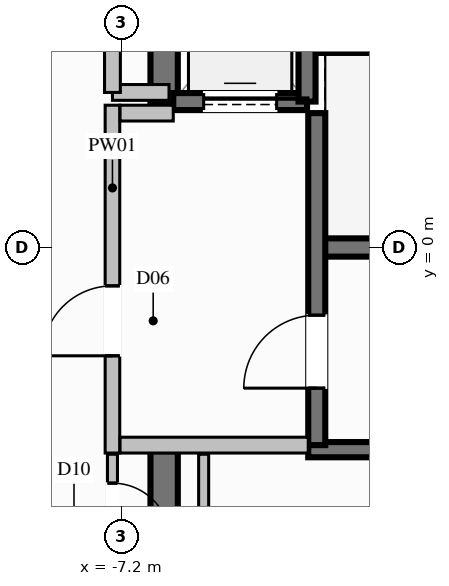
"""IFC4 building model, lengths in metres.
Left out: names, types, materials, properties, quantities, classifications, styles, units other than length and angle.
Written with IfcOpenShell. Run it as: python <this file> out.ifc"""

import sys

from ifc_helpers import new_model, si_unit, direction, frame, frame_2d, origin, place, context, subcontext, project, spatial, rectangle, extrude, element, fill, save


model = new_model("IFC4")
c1 = context("Model", 3, precision=1e-05, world=origin(), true_north=direction((0.0, 1.0)))
c2 = subcontext(c1, "Body", "Model", "MODEL_VIEW")
j1 = project(units=[si_unit("LENGTHUNIT", "METRE"), si_unit("PLANEANGLEUNIT", "RADIAN")], contexts=[c1])
p1 = place(None, origin())
s1 = spatial("IfcSite", under=j1, at=p1, CompositionType="ELEMENT")
p2 = place(p1, origin())
s2 = spatial("IfcBuilding", under=s1, at=p2, CompositionType="ELEMENT")
p3 = place(p2, frame((0.0, 0.0, 278.2)))
s3 = spatial("IfcBuildingStorey", under=s2, at=p3, CompositionType="ELEMENT", Elevation=278.2)
p4 = place(p3, frame((-3.99, 0.0, 0.0), z_axis=(0.0, 0.0, 1.0), x_axis=(1.0, 0.0, 0.0)))
e1 = element("IfcWall", 1, at=p4, inside=s3, PredefinedType="SHEAR", context=c2, shape_type="SweptSolid", body=[
    extrude(rectangle(XDim=7.98, YDim=0.3, at=frame_2d((3.99, 0.0))), origin(), (0.0, 0.0, 1.0), 3.8),
])
for number, where, z_axis, x_axis in (
    (2, (-4.13, -3.325, 0.0), (0.0, 0.0, 1.0), (1.0, 0.0, 0.0)),
    (3, (-4.13, 3.325, 0.0), (0.0, 0.0, 1.0), (1.0, 0.0, 0.0)),
):
    element("IfcWall", number, at=place(p3, frame(where, z_axis=z_axis, x_axis=x_axis)), inside=s3, PredefinedType="SOLIDWALL", context=c2, shape_type="SweptSolid", body=[
        extrude(rectangle(XDim=8.26, YDim=0.25, at=frame_2d((4.13, 0.0))), origin(), (0.0, 0.0, 1.0), 3.8),
    ])
p5 = place(p3, frame((-6.5, 2.35, 0.0), z_axis=(0.0, 0.0, 1.0), x_axis=(0.0, 1.0, 0.0)))
e4 = element("IfcWall", 4, at=p5, inside=s3, PredefinedType="SHEAR", context=c2, shape_type="SweptSolid", body=[
    extrude(rectangle(XDim=3.975, YDim=0.45, at=frame_2d((1.987, 0.0))), origin(), (0.0, 0.0, 1.0), 3.8),
])
p6 = place(p3, frame((-6.5, -6.325, 0.0), z_axis=(0.0, 0.0, 1.0), x_axis=(0.0, 1.0, 0.0)))
e5 = element("IfcWall", 5, at=p6, inside=s3, PredefinedType="SHEAR", context=c2, shape_type="SweptSolid", body=[
    extrude(rectangle(XDim=2.975, YDim=0.45, at=frame_2d((1.487, 0.0))), origin(), (0.0, 0.0, 1.0), 3.8),
])
p7 = place(p3, frame((-6.35, 2.4, 0.0), z_axis=(0.0, 0.0, 1.0), x_axis=(1.0, 0.0, 0.0)))
e6 = element("IfcWall", 6, at=p7, inside=s3, PredefinedType="SOLIDWALL", context=c2, shape_type="SweptSolid", body=[
    extrude(rectangle(XDim=2.2, YDim=0.28, at=frame_2d((1.1, 0.0))), origin(), (0.0, 0.0, 1.0), 3.57),
])
p8 = place(p7, frame((0.5, 0.0, 0.0)))
e7 = element("IfcOpeningElement", 7, at=p8, cuts=e6, PredefinedType="OPENING", context=c2, shape_type="SweptSolid", body=[
    extrude(rectangle(XDim=1.2, YDim=2.2, at=frame_2d((0.6, 1.1))), frame((0.0, 0.15, 0.0), z_axis=(0.0, -1.0, 0.0), x_axis=(1.0, 0.0, 0.0)), (0.0, 0.0, 1.0), 0.3),
])
p9 = place(p3, frame((-4.15, 2.4, 0.0), z_axis=(0.0, 0.0, 1.0), x_axis=(0.0, 1.0, 0.0)))
e8 = element("IfcWall", 8, at=p9, inside=s3, PredefinedType="SOLIDWALL", context=c2, shape_type="SweptSolid", body=[
    extrude(rectangle(XDim=2.7, YDim=0.28, at=frame_2d((1.35, 0.0))), origin(), (0.0, 0.0, 1.0), 3.57),
])
p10 = place(p3, frame((-3.99, -3.25, 0.0), z_axis=(0.0, 0.0, 1.0), x_axis=(0.0, 1.0, 0.0)))
e9 = element("IfcWall", 9, at=p10, inside=s3, PredefinedType="SOLIDWALL", context=c2, shape_type="SweptSolid", body=[
    extrude(rectangle(XDim=5.46, YDim=0.28, at=frame_2d((2.73, 0.0))), origin(), (0.0, 0.0, 1.0), 3.57),
])
p11 = place(p10, frame((0.937, 0.0, 0.0)))
e10 = element("IfcOpeningElement", 10, at=p11, cuts=e9, PredefinedType="OPENING", context=c2, shape_type="SweptSolid", body=[
    extrude(rectangle(XDim=1.2, YDim=2.2, at=frame_2d((0.6, 1.1))), frame((0.0, 0.15, 0.0), z_axis=(0.0, -1.0, 0.0), x_axis=(1.0, 0.0, 0.0)), (0.0, 0.0, 1.0), 0.3),
])
p12 = place(p3, frame((-7.35, -3.38, 0.0), z_axis=(0.0, 0.0, 1.0), x_axis=(0.0, 1.0, 0.0)))
e11 = element("IfcWall", 11, at=p12, inside=s3, PredefinedType="PARTITIONING", context=c2, shape_type="SweptSolid", body=[
    extrude(rectangle(XDim=5.72, YDim=0.24, at=frame_2d((2.86, 0.0))), origin(), (0.0, 0.0, 1.0), 2.655),
])
p13 = place(p12, frame((1.599, 0.0, 0.0)))
e12 = element("IfcOpeningElement", 12, at=p13, cuts=e11, PredefinedType="OPENING", context=c2, shape_type="SweptSolid", body=[
    extrude(rectangle(XDim=1.15, YDim=2.2, at=frame_2d((0.575, 1.1))), frame((0.0, 0.13, 0.0), z_axis=(0.0, -1.0, 0.0), x_axis=(1.0, 0.0, 0.0)), (0.0, 0.0, 1.0), 0.26),
])
p14 = place(p3, frame((-7.225, -3.25, 0.0), z_axis=(0.0, 0.0, 1.0), x_axis=(1.0, 0.0, 0.0)))
e13 = element("IfcWall", 13, at=p14, inside=s3, PredefinedType="PARTITIONING", context=c2, shape_type="SweptSolid", body=[
    extrude(rectangle(XDim=3.095, YDim=0.26, at=frame_2d((1.548, 0.0))), origin(), (0.0, 0.0, 1.0), 3.57),
])
p15 = place(p3, frame((-7.225, 2.21, 0.0), z_axis=(0.0, 0.0, 1.0), x_axis=(1.0, 0.0, 0.0)))
e14 = element("IfcWall", 14, at=p15, inside=s3, PredefinedType="PARTITIONING", context=c2, shape_type="SweptSolid", body=[
    extrude(rectangle(XDim=0.875, YDim=0.26, at=frame_2d((0.438, 0.0))), origin(), (0.0, 0.0, 1.0), 3.57),
])
p16 = place(p3, frame((-7.35, 2.55, 0.0), z_axis=(0.0, 0.0, 1.0), x_axis=(1.0, 0.0, 0.0)))
e15 = element("IfcWall", 15, at=p16, inside=s3, PredefinedType="PARTITIONING", context=c2, shape_type="SweptSolid", body=[
    extrude(rectangle(XDim=0.93, YDim=0.26, at=frame_2d((0.465, 0.0))), origin(), (0.0, 0.0, 1.0), 3.57),
])
p17 = place(p3, frame((-7.35, 2.55, 0.0), z_axis=(0.0, 0.0, 1.0), x_axis=(0.0, 1.0, 0.0)))
e16 = element("IfcWall", 16, at=p17, inside=s3, PredefinedType="PARTITIONING", context=c2, shape_type="SweptSolid", body=[
    extrude(rectangle(XDim=2.4, YDim=0.26, at=frame_2d((1.2, 0.0))), origin(), (0.0, 0.0, 1.0), 2.655),
])
p18 = place(p17, frame((0.775, 0.0, 0.0)))
e17 = element("IfcOpeningElement", 17, at=p18, cuts=e16, PredefinedType="OPENING", context=c2, shape_type="SweptSolid", body=[
    extrude(rectangle(XDim=0.85, YDim=2.05, at=frame_2d((0.425, 1.025))), frame((0.0, 0.14, 0.0), z_axis=(0.0, -1.0, 0.0), x_axis=(1.0, 0.0, 0.0)), (0.0, 0.0, 1.0), 0.28),
])
p19 = place(p3, frame((-5.85, -5.3, 0.0), z_axis=(0.0, 0.0, 1.0), x_axis=(0.0, 1.0, 0.0)))
e18 = element("IfcWall", 18, at=p19, inside=s3, PredefinedType="PARTITIONING", context=c2, shape_type="SweptSolid", body=[
    extrude(rectangle(XDim=1.9, YDim=0.165, at=frame_2d((0.95, 0.0))), origin(), (0.0, 0.0, 1.0), 2.655),
])
p20 = place(p3, frame((-7.35, -3.4, 0.0), z_axis=(0.0, 0.0, 1.0), x_axis=(0.0, -1.0, 0.0)))
e19 = element("IfcWall", 19, at=p20, inside=s3, PredefinedType="PARTITIONING", context=c2, shape_type="SweptSolid", body=[
    extrude(rectangle(XDim=1.9, YDim=0.165, at=frame_2d((0.95, 0.0))), origin(), (0.0, 0.0, 1.0), 3.57),
])
p21 = place(p20, frame((0.475, 0.0, 0.0)))
e20 = element("IfcOpeningElement", 20, at=p21, cuts=e19, PredefinedType="OPENING", context=c2, shape_type="SweptSolid", body=[
    extrude(rectangle(XDim=0.95, YDim=2.1, at=frame_2d((0.475, 1.05))), frame((0.0, 0.093, 0.0), z_axis=(0.0, -1.0, 0.0), x_axis=(1.0, 0.0, 0.0)), (0.0, 0.0, 1.0), 0.185),
])
p22 = place(p8, origin())
e21 = element("IfcDoor", 21, at=p22, inside=s3, OperationType="SLIDING_TO_LEFT", PredefinedType="DOOR", context=c2, shape_type="SweptSolid", body=[
    extrude(rectangle(XDim=1.2, YDim=2.2, at=frame_2d((0.6, 1.1))), frame((0.0, 0.025, 0.0), z_axis=(0.0, -1.0, 0.0), x_axis=(1.0, 0.0, 0.0)), (0.0, 0.0, 1.0), 0.05),
])
fill(e7, e21)
p23 = place(p11, origin())
e22 = element("IfcDoor", 22, at=p23, inside=s3, OperationType="SINGLE_SWING_LEFT", PredefinedType="DOOR", context=c2, shape_type="SweptSolid", body=[
    extrude(rectangle(XDim=1.2, YDim=2.2, at=frame_2d((0.6, 1.1))), frame((0.0, 0.025, 0.0), z_axis=(0.0, -1.0, 0.0), x_axis=(1.0, 0.0, 0.0)), (0.0, 0.0, 1.0), 0.05),
])
fill(e10, e22)
p24 = place(p13, origin())
e23 = element("IfcDoor", 23, at=p24, inside=s3, OperationType="SINGLE_SWING_LEFT", PredefinedType="DOOR", context=c2, shape_type="SweptSolid", body=[
    extrude(rectangle(XDim=1.15, YDim=2.2, at=frame_2d((0.575, 1.1))), frame((0.0, 0.025, 0.0), z_axis=(0.0, -1.0, 0.0), x_axis=(1.0, 0.0, 0.0)), (0.0, 0.0, 1.0), 0.05),
])
fill(e12, e23)
p25 = place(p21, origin())
e24 = element("IfcDoor", 24, at=p25, inside=s3, OperationType="SINGLE_SWING_RIGHT", PredefinedType="DOOR", context=c2, shape_type="SweptSolid", body=[
    extrude(rectangle(XDim=0.95, YDim=2.1, at=frame_2d((0.475, 1.05))), frame((0.0, 0.025, 0.0), z_axis=(0.0, -1.0, 0.0), x_axis=(1.0, 0.0, 0.0)), (0.0, 0.0, 1.0), 0.05),
])
fill(e20, e24)
save(model, sys.argv[1])
